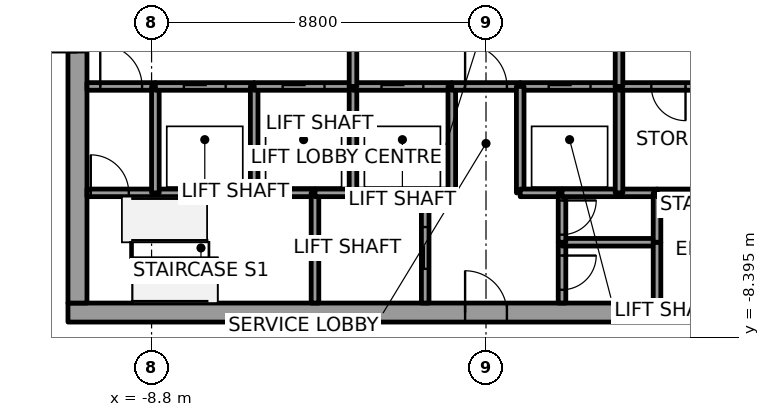
"""IFC4 building model, lengths in metres.
Left out: names, types, materials, properties, quantities, classifications, styles, units other than length and angle.
Written with IfcOpenShell. Run it as: python <this file> out.ifc"""

import sys

from ifc_helpers import new_model, si_unit, direction, frame, frame_2d, origin, place, context, subcontext, project, spatial, rectangle, extrude, element, fill, save


model = new_model("IFC4")
c1 = context("Model", 3, precision=1e-05, world=origin(), true_north=direction((0.0, 1.0)))
c2 = subcontext(c1, "Body", "Model", "MODEL_VIEW")
j1 = project(units=[si_unit("LENGTHUNIT", "METRE"), si_unit("PLANEANGLEUNIT", "RADIAN")], contexts=[c1])
p1 = place(None, origin())
s1 = spatial("IfcSite", under=j1, at=p1, CompositionType="ELEMENT")
p2 = place(p1, origin())
s2 = spatial("IfcBuilding", under=s1, at=p2, CompositionType="ELEMENT")
p3 = place(p2, frame((0.0, 0.0, 28.8)))
s3 = spatial("IfcBuildingStorey", under=s2, at=p3, CompositionType="ELEMENT", Elevation=28.8)
p4 = place(p3, frame((-11.0, -7.75, 0.0), z_axis=(0.0, 0.0, 1.0), x_axis=(1.0, 0.0, 0.0)))
e1 = element("IfcWall", 1, at=p4, inside=s3, PredefinedType="SHEAR", context=c2, shape_type="SweptSolid", body=[
    extrude(rectangle(XDim=22.0, YDim=0.5, at=frame_2d((11.0, 0.0))), origin(), (0.0, 0.0, 1.0), 5.4),
])
p5 = place(p4, frame((10.45, 0.0, 0.0)))
e2 = element("IfcOpeningElement", 2, at=p5, cuts=e1, PredefinedType="OPENING", context=c2, shape_type="SweptSolid", body=[
    extrude(rectangle(XDim=1.1, YDim=2.1, at=frame_2d((0.55, 1.05))), frame((0.0, 0.25, 0.0), z_axis=(0.0, -1.0, 0.0), x_axis=(1.0, 0.0, 0.0)), (0.0, 0.0, 1.0), 0.5),
])
p6 = place(p3, frame((-10.75, -7.5, 0.0), z_axis=(0.0, 0.0, 1.0), x_axis=(0.0, 1.0, 0.0)))
e3 = element("IfcWall", 3, at=p6, inside=s3, PredefinedType="SHEAR", context=c2, shape_type="SweptSolid", body=[
    extrude(rectangle(XDim=15.0, YDim=0.5, at=frame_2d((7.5, 0.0))), origin(), (0.0, 0.0, 1.0), 5.4),
])
p7 = place(p6, frame((6.6, 0.0, 0.0)))
e4 = element("IfcOpeningElement", 4, at=p7, cuts=e3, PredefinedType="OPENING", context=c2, shape_type="SweptSolid", body=[
    extrude(rectangle(XDim=1.8, YDim=2.1, at=frame_2d((0.9, 1.05))), frame((0.0, 0.25, 0.0), z_axis=(0.0, -1.0, 0.0), x_axis=(1.0, 0.0, 0.0)), (0.0, 0.0, 1.0), 0.5),
])
p8 = place(p3, frame((-10.5, -4.6, 0.0), z_axis=(0.0, 0.0, 1.0), x_axis=(1.0, 0.0, 0.0)))
e5 = element("IfcWall", 5, at=p8, inside=s3, PredefinedType="SOLIDWALL", context=c2, shape_type="SweptSolid", body=[
    extrude(rectangle(XDim=1.8, YDim=0.2, at=frame_2d((0.9, 0.0))), origin(), (0.0, 0.0, 1.0), 5.0),
])
p9 = place(p8, frame((0.1, 0.0, 0.0)))
e6 = element("IfcOpeningElement", 6, at=p9, cuts=e5, PredefinedType="OPENING", context=c2, shape_type="SweptSolid", body=[
    extrude(rectangle(XDim=1.0, YDim=2.1, at=frame_2d((0.5, 1.05))), frame((0.0, 0.1, 0.0), z_axis=(0.0, -1.0, 0.0), x_axis=(1.0, 0.0, 0.0)), (0.0, 0.0, 1.0), 0.2),
])
p10 = place(p3, frame((-10.5, -1.8, 0.0), z_axis=(0.0, 0.0, 1.0), x_axis=(1.0, 0.0, 0.0)))
e7 = element("IfcWall", 7, at=p10, inside=s3, PredefinedType="SOLIDWALL", context=c2, shape_type="SweptSolid", body=[
    extrude(rectangle(XDim=1.8, YDim=0.2, at=frame_2d((0.9, 0.0))), origin(), (0.0, 0.0, 1.0), 5.0),
])
p11 = place(p10, frame((0.35, 0.0, 0.0)))
e8 = element("IfcOpeningElement", 8, at=p11, cuts=e7, PredefinedType="OPENING", context=c2, shape_type="SweptSolid", body=[
    extrude(rectangle(XDim=1.1, YDim=2.4, at=frame_2d((0.55, 1.2))), frame((0.0, 0.1, 0.0), z_axis=(0.0, -1.0, 0.0), x_axis=(1.0, 0.0, 0.0)), (0.0, 0.0, 1.0), 0.2),
])
p12 = place(p3, frame((-8.7, -4.6, 0.0), z_axis=(0.0, 0.0, 1.0), x_axis=(1.0, 0.0, 0.0)))
e9 = element("IfcWall", 9, at=p12, inside=s3, PredefinedType="SOLIDWALL", context=c2, shape_type="SweptSolid", body=[
    extrude(rectangle(XDim=2.6, YDim=0.2, at=frame_2d((1.3, 0.0))), origin(), (0.0, 0.0, 1.0), 5.0),
])
p13 = place(p3, frame((-8.7, -4.6, 0.0), z_axis=(0.0, 0.0, 1.0), x_axis=(0.0, 1.0, 0.0)))
e10 = element("IfcWall", 10, at=p13, inside=s3, PredefinedType="SOLIDWALL", context=c2, shape_type="SweptSolid", body=[
    extrude(rectangle(XDim=2.8, YDim=0.2, at=frame_2d((1.4, 0.0))), origin(), (0.0, 0.0, 1.0), 5.0),
])
p14 = place(p3, frame((-8.7, -1.8, 0.0), z_axis=(0.0, 0.0, 1.0), x_axis=(1.0, 0.0, 0.0)))
e11 = element("IfcWall", 11, at=p14, inside=s3, PredefinedType="SOLIDWALL", context=c2, shape_type="SweptSolid", body=[
    extrude(rectangle(XDim=2.6, YDim=0.2, at=frame_2d((1.3, 0.0))), origin(), (0.0, 0.0, 1.0), 5.0),
])
p15 = place(p14, frame((0.75, 0.0, 0.0)))
e12 = element("IfcOpeningElement", 12, at=p15, cuts=e11, PredefinedType="OPENING", context=c2, shape_type="SweptSolid", body=[
    extrude(rectangle(XDim=1.1, YDim=2.1, at=frame_2d((0.55, 1.05))), frame((0.0, 0.1, 0.0), z_axis=(0.0, -1.0, 0.0), x_axis=(1.0, 0.0, 0.0)), (0.0, 0.0, 1.0), 0.2),
])
p16 = place(p3, frame((-6.1, -4.6, 0.0), z_axis=(0.0, 0.0, 1.0), x_axis=(1.0, 0.0, 0.0)))
e13 = element("IfcWall", 13, at=p16, inside=s3, PredefinedType="SOLIDWALL", context=c2, shape_type="SweptSolid", body=[
    extrude(rectangle(XDim=1.6, YDim=0.2, at=frame_2d((0.8, 0.0))), origin(), (0.0, 0.0, 1.0), 5.0),
])
p17 = place(p3, frame((-6.1, -4.6, 0.0), z_axis=(0.0, 0.0, 1.0), x_axis=(0.0, 1.0, 0.0)))
e14 = element("IfcWall", 14, at=p17, inside=s3, PredefinedType="SOLIDWALL", context=c2, shape_type="SweptSolid", body=[
    extrude(rectangle(XDim=2.8, YDim=0.2, at=frame_2d((1.4, 0.0))), origin(), (0.0, 0.0, 1.0), 5.0),
])
p18 = place(p3, frame((-6.1, -1.8, 0.0), z_axis=(0.0, 0.0, 1.0), x_axis=(1.0, 0.0, 0.0)))
e15 = element("IfcWall", 15, at=p18, inside=s3, PredefinedType="SOLIDWALL", context=c2, shape_type="SweptSolid", body=[
    extrude(rectangle(XDim=2.6, YDim=0.2, at=frame_2d((1.3, 0.0))), origin(), (0.0, 0.0, 1.0), 5.0),
])
p19 = place(p18, frame((0.75, 0.0, 0.0)))
e16 = element("IfcOpeningElement", 16, at=p19, cuts=e15, PredefinedType="OPENING", context=c2, shape_type="SweptSolid", body=[
    extrude(rectangle(XDim=1.1, YDim=2.1, at=frame_2d((0.55, 1.05))), frame((0.0, 0.1, 0.0), z_axis=(0.0, -1.0, 0.0), x_axis=(1.0, 0.0, 0.0)), (0.0, 0.0, 1.0), 0.2),
])
p20 = place(p3, frame((-4.5, -4.6, 0.0), z_axis=(0.0, 0.0, 1.0), x_axis=(0.0, -1.0, 0.0)))
e17 = element("IfcWall", 17, at=p20, inside=s3, PredefinedType="SOLIDWALL", context=c2, shape_type="SweptSolid", body=[
    extrude(rectangle(XDim=2.9, YDim=0.2, at=frame_2d((1.45, 0.0))), origin(), (0.0, 0.0, 1.0), 5.0),
])
p21 = place(p3, frame((-4.5, -4.6, 0.0), z_axis=(0.0, 0.0, 1.0), x_axis=(1.0, 0.0, 0.0)))
e18 = element("IfcWall", 18, at=p21, inside=s3, PredefinedType="SOLIDWALL", context=c2, shape_type="SweptSolid", body=[
    extrude(rectangle(XDim=1.0, YDim=0.2, at=frame_2d((0.5, 0.0))), origin(), (0.0, 0.0, 1.0), 5.0),
])
p22 = place(p3, frame((-3.5, -4.6, 0.0), z_axis=(0.0, 0.0, 1.0), x_axis=(1.0, 0.0, 0.0)))
e19 = element("IfcWall", 19, at=p22, inside=s3, PredefinedType="SOLIDWALL", context=c2, shape_type="SweptSolid", body=[
    extrude(rectangle(XDim=1.9, YDim=0.2, at=frame_2d((0.95, 0.0))), origin(), (0.0, 0.0, 1.0), 5.0),
])
p23 = place(p3, frame((-3.5, -4.6, 0.0), z_axis=(0.0, 0.0, 1.0), x_axis=(0.0, 1.0, 0.0)))
e20 = element("IfcWall", 20, at=p23, inside=s3, PredefinedType="SOLIDWALL", context=c2, shape_type="SweptSolid", body=[
    extrude(rectangle(XDim=2.8, YDim=0.2, at=frame_2d((1.4, 0.0))), origin(), (0.0, 0.0, 1.0), 5.0),
])
p24 = place(p3, frame((-3.5, -1.8, 0.0), z_axis=(0.0, 0.0, 1.0), x_axis=(1.0, 0.0, 0.0)))
e21 = element("IfcWall", 21, at=p24, inside=s3, PredefinedType="SOLIDWALL", context=c2, shape_type="SweptSolid", body=[
    extrude(rectangle(XDim=2.6, YDim=0.2, at=frame_2d((1.3, 0.0))), origin(), (0.0, 0.0, 1.0), 5.0),
])
p25 = place(p24, frame((0.75, 0.0, 0.0)))
e22 = element("IfcOpeningElement", 22, at=p25, cuts=e21, PredefinedType="OPENING", context=c2, shape_type="SweptSolid", body=[
    extrude(rectangle(XDim=1.1, YDim=2.1, at=frame_2d((0.55, 1.05))), frame((0.0, 0.1, 0.0), z_axis=(0.0, -1.0, 0.0), x_axis=(1.0, 0.0, 0.0)), (0.0, 0.0, 1.0), 0.2),
])
p26 = place(p3, frame((-3.5, 1.8, 0.0), z_axis=(0.0, 0.0, 1.0), x_axis=(0.0, -1.0, 0.0)))
e23 = element("IfcWall", 23, at=p26, inside=s3, PredefinedType="SOLIDWALL", context=c2, shape_type="SweptSolid", body=[
    extrude(rectangle(XDim=3.6, YDim=0.2, at=frame_2d((1.8, 0.0))), origin(), (0.0, 0.0, 1.0), 5.0),
])
p27 = place(p26, frame((1.05, 0.0, 0.0)))
e24 = element("IfcOpeningElement", 24, at=p27, cuts=e23, PredefinedType="OPENING", context=c2, shape_type="SweptSolid", body=[
    extrude(rectangle(XDim=1.5, YDim=2.4, at=frame_2d((0.75, 1.2))), frame((0.0, 0.1, 0.0), z_axis=(0.0, -1.0, 0.0), x_axis=(1.0, 0.0, 0.0)), (0.0, 0.0, 1.0), 0.2),
])
p28 = place(p3, frame((-1.6, -7.5, 0.0), z_axis=(0.0, 0.0, 1.0), x_axis=(0.0, 1.0, 0.0)))
e25 = element("IfcWall", 25, at=p28, inside=s3, PredefinedType="SOLIDWALL", context=c2, shape_type="SweptSolid", body=[
    extrude(rectangle(XDim=2.9, YDim=0.2, at=frame_2d((1.45, 0.0))), origin(), (0.0, 0.0, 1.0), 5.0),
])
p29 = place(p28, frame((0.9, 0.0, 0.0)))
e26 = element("IfcOpeningElement", 26, at=p29, cuts=e25, PredefinedType="OPENING", context=c2, shape_type="SweptSolid", body=[
    extrude(rectangle(XDim=1.1, YDim=2.1, at=frame_2d((0.55, 1.05))), frame((0.0, 0.1, 0.0), z_axis=(0.0, -1.0, 0.0), x_axis=(1.0, 0.0, 0.0)), (0.0, 0.0, 1.0), 0.2),
])
p30 = place(p3, frame((-1.6, -4.6, 0.0), z_axis=(0.0, 0.0, 1.0), x_axis=(1.0, 0.0, 0.0)))
e27 = element("IfcWall", 27, at=p30, inside=s3, PredefinedType="SOLIDWALL", context=c2, shape_type="SweptSolid", body=[
    extrude(rectangle(XDim=0.7, YDim=0.2, at=frame_2d((0.35, 0.0))), origin(), (0.0, 0.0, 1.0), 5.0),
])
p31 = place(p3, frame((-0.9, -4.6, 0.0), z_axis=(0.0, 0.0, 1.0), x_axis=(0.0, 1.0, 0.0)))
e28 = element("IfcWall", 28, at=p31, inside=s3, PredefinedType="SOLIDWALL", context=c2, shape_type="SweptSolid", body=[
    extrude(rectangle(XDim=2.8, YDim=0.2, at=frame_2d((1.4, 0.0))), origin(), (0.0, 0.0, 1.0), 5.0),
])
p32 = place(p3, frame((-0.9, -1.8, 0.0), z_axis=(0.0, 0.0, 1.0), x_axis=(1.0, 0.0, 0.0)))
e29 = element("IfcWall", 29, at=p32, inside=s3, PredefinedType="SOLIDWALL", context=c2, shape_type="SweptSolid", body=[
    extrude(rectangle(XDim=1.8, YDim=0.2, at=frame_2d((0.9, 0.0))), origin(), (0.0, 0.0, 1.0), 5.0),
])
p33 = place(p32, frame((0.35, 0.0, 0.0)))
e30 = element("IfcOpeningElement", 30, at=p33, cuts=e29, PredefinedType="OPENING", context=c2, shape_type="SweptSolid", body=[
    extrude(rectangle(XDim=1.1, YDim=2.4, at=frame_2d((0.55, 1.2))), frame((0.0, 0.1, 0.0), z_axis=(0.0, -1.0, 0.0), x_axis=(1.0, 0.0, 0.0)), (0.0, 0.0, 1.0), 0.2),
])
p34 = place(p3, frame((0.9, -1.8, 0.0), z_axis=(0.0, 0.0, 1.0), x_axis=(1.0, 0.0, 0.0)))
e31 = element("IfcWall", 31, at=p34, inside=s3, PredefinedType="SOLIDWALL", context=c2, shape_type="SweptSolid", body=[
    extrude(rectangle(XDim=2.6, YDim=0.2, at=frame_2d((1.3, 0.0))), origin(), (0.0, 0.0, 1.0), 5.0),
])
p35 = place(p34, frame((0.75, 0.0, 0.0)))
e32 = element("IfcOpeningElement", 32, at=p35, cuts=e31, PredefinedType="OPENING", context=c2, shape_type="SweptSolid", body=[
    extrude(rectangle(XDim=1.1, YDim=2.1, at=frame_2d((0.55, 1.05))), frame((0.0, 0.1, 0.0), z_axis=(0.0, -1.0, 0.0), x_axis=(1.0, 0.0, 0.0)), (0.0, 0.0, 1.0), 0.2),
])
p36 = place(p3, frame((0.9, -1.8, 0.0), z_axis=(0.0, 0.0, 1.0), x_axis=(0.0, -1.0, 0.0)))
e33 = element("IfcWall", 33, at=p36, inside=s3, PredefinedType="SOLIDWALL", context=c2, shape_type="SweptSolid", body=[
    extrude(rectangle(XDim=2.8, YDim=0.2, at=frame_2d((1.4, 0.0))), origin(), (0.0, 0.0, 1.0), 5.0),
])
p37 = place(p3, frame((0.9, -4.6, 0.0), z_axis=(0.0, 0.0, 1.0), x_axis=(1.0, 0.0, 0.0)))
e34 = element("IfcWall", 34, at=p37, inside=s3, PredefinedType="SOLIDWALL", context=c2, shape_type="SweptSolid", body=[
    extrude(rectangle(XDim=1.1, YDim=0.2, at=frame_2d((0.55, 0.0))), origin(), (0.0, 0.0, 1.0), 5.0),
])
p38 = place(p3, frame((2.0, -5.9, 0.0), z_axis=(0.0, 0.0, 1.0), x_axis=(0.0, -1.0, 0.0)))
e35 = element("IfcWall", 35, at=p38, inside=s3, PredefinedType="SOLIDWALL", context=c2, shape_type="SweptSolid", body=[
    extrude(rectangle(XDim=1.6, YDim=0.2, at=frame_2d((0.8, 0.0))), origin(), (0.0, 0.0, 1.0), 5.0),
])
p39 = place(p38, frame((0.35, 0.0, 0.0)))
e36 = element("IfcOpeningElement", 36, at=p39, cuts=e35, PredefinedType="OPENING", context=c2, shape_type="SweptSolid", body=[
    extrude(rectangle(XDim=0.9, YDim=2.4, at=frame_2d((0.45, 1.2))), frame((0.0, 0.1, 0.0), z_axis=(0.0, -1.0, 0.0), x_axis=(1.0, 0.0, 0.0)), (0.0, 0.0, 1.0), 0.2),
])
p40 = place(p3, frame((4.5, -5.9, 0.0), z_axis=(0.0, 0.0, 1.0), x_axis=(-1.0, 0.0, 0.0)))
e37 = element("IfcWall", 37, at=p40, inside=s3, PredefinedType="SOLIDWALL", context=c2, shape_type="SweptSolid", body=[
    extrude(rectangle(XDim=2.5, YDim=0.2, at=frame_2d((1.25, 0.0))), origin(), (0.0, 0.0, 1.0), 5.0),
])
p41 = place(p3, frame((2.0, -4.6, 0.0), z_axis=(0.0, 0.0, 1.0), x_axis=(0.0, -1.0, 0.0)))
e38 = element("IfcWall", 38, at=p41, inside=s3, PredefinedType="SOLIDWALL", context=c2, shape_type="SweptSolid", body=[
    extrude(rectangle(XDim=1.3, YDim=0.2, at=frame_2d((0.65, 0.0))), origin(), (0.0, 0.0, 1.0), 5.0),
])
p42 = place(p41, frame((0.2, 0.0, 0.0)))
e39 = element("IfcOpeningElement", 39, at=p42, cuts=e38, PredefinedType="OPENING", context=c2, shape_type="SweptSolid", body=[
    extrude(rectangle(XDim=0.9, YDim=2.4, at=frame_2d((0.45, 1.2))), frame((0.0, 0.1, 0.0), z_axis=(0.0, -1.0, 0.0), x_axis=(1.0, 0.0, 0.0)), (0.0, 0.0, 1.0), 0.2),
])
p43 = place(p3, frame((3.5, -4.6, 0.0), z_axis=(0.0, 0.0, 1.0), x_axis=(-1.0, 0.0, 0.0)))
e40 = element("IfcWall", 40, at=p43, inside=s3, PredefinedType="SOLIDWALL", context=c2, shape_type="SweptSolid", body=[
    extrude(rectangle(XDim=1.5, YDim=0.2, at=frame_2d((0.75, 0.0))), origin(), (0.0, 0.0, 1.0), 5.0),
])
p44 = place(p3, frame((3.5, -4.6, 0.0), z_axis=(0.0, 0.0, 1.0), x_axis=(1.0, 0.0, 0.0)))
e41 = element("IfcWall", 41, at=p44, inside=s3, PredefinedType="SOLIDWALL", context=c2, shape_type="SweptSolid", body=[
    extrude(rectangle(XDim=1.0, YDim=0.2, at=frame_2d((0.5, 0.0))), origin(), (0.0, 0.0, 1.0), 5.0),
])
p45 = place(p3, frame((3.5, -1.8, 0.0), z_axis=(0.0, 0.0, 1.0), x_axis=(0.0, -1.0, 0.0)))
e42 = element("IfcWall", 42, at=p45, inside=s3, PredefinedType="SOLIDWALL", context=c2, shape_type="SweptSolid", body=[
    extrude(rectangle(XDim=2.8, YDim=0.2, at=frame_2d((1.4, 0.0))), origin(), (0.0, 0.0, 1.0), 5.0),
])
p46 = place(p3, frame((6.1, -1.8, 0.0), z_axis=(0.0, 0.0, 1.0), x_axis=(-1.0, 0.0, 0.0)))
e43 = element("IfcWall", 43, at=p46, inside=s3, PredefinedType="SOLIDWALL", context=c2, shape_type="SweptSolid", body=[
    extrude(rectangle(XDim=2.6, YDim=0.2, at=frame_2d((1.3, 0.0))), origin(), (0.0, 0.0, 1.0), 5.0),
])
p47 = place(p46, frame((0.85, 0.0, 0.0)))
e44 = element("IfcOpeningElement", 44, at=p47, cuts=e43, PredefinedType="OPENING", context=c2, shape_type="SweptSolid", body=[
    extrude(rectangle(XDim=0.9, YDim=2.4, at=frame_2d((0.45, 1.2))), frame((0.0, 0.1, 0.0), z_axis=(0.0, -1.0, 0.0), x_axis=(1.0, 0.0, 0.0)), (0.0, 0.0, 1.0), 0.2),
])
p48 = place(p3, frame((3.5, -1.8, 0.0), z_axis=(0.0, 0.0, 1.0), x_axis=(0.0, 1.0, 0.0)))
e45 = element("IfcWall", 45, at=p48, inside=s3, PredefinedType="SOLIDWALL", context=c2, shape_type="SweptSolid", body=[
    extrude(rectangle(XDim=3.6, YDim=0.2, at=frame_2d((1.8, 0.0))), origin(), (0.0, 0.0, 1.0), 5.0),
])
p49 = place(p48, frame((1.05, 0.0, 0.0)))
e46 = element("IfcOpeningElement", 46, at=p49, cuts=e45, PredefinedType="OPENING", context=c2, shape_type="SweptSolid", body=[
    extrude(rectangle(XDim=1.5, YDim=2.4, at=frame_2d((0.75, 1.2))), frame((0.0, 0.1, 0.0), z_axis=(0.0, -1.0, 0.0), x_axis=(1.0, 0.0, 0.0)), (0.0, 0.0, 1.0), 0.2),
])
p50 = place(p3, frame((4.5, -7.5, 0.0), z_axis=(0.0, 0.0, 1.0), x_axis=(0.0, 1.0, 0.0)))
e47 = element("IfcWall", 47, at=p50, inside=s3, PredefinedType="SOLIDWALL", context=c2, shape_type="SweptSolid", body=[
    extrude(rectangle(XDim=1.6, YDim=0.2, at=frame_2d((0.8, 0.0))), origin(), (0.0, 0.0, 1.0), 5.0),
])
p51 = place(p3, frame((4.5, -5.9, 0.0), z_axis=(0.0, 0.0, 1.0), x_axis=(0.0, 1.0, 0.0)))
e48 = element("IfcWall", 48, at=p51, inside=s3, PredefinedType="SOLIDWALL", context=c2, shape_type="SweptSolid", body=[
    extrude(rectangle(XDim=1.3, YDim=0.2, at=frame_2d((0.65, 0.0))), origin(), (0.0, 0.0, 1.0), 5.0),
])
p52 = place(p3, frame((4.5, -4.6, 0.0), z_axis=(0.0, 0.0, 1.0), x_axis=(1.0, 0.0, 0.0)))
e49 = element("IfcWall", 49, at=p52, inside=s3, PredefinedType="SOLIDWALL", context=c2, shape_type="SweptSolid", body=[
    extrude(rectangle(XDim=1.6, YDim=0.2, at=frame_2d((0.8, 0.0))), origin(), (0.0, 0.0, 1.0), 5.0),
])
p53 = place(p15, origin())
e50 = element("IfcDoor", 50, at=p53, inside=s3, OperationType="SLIDING_TO_LEFT", PredefinedType="DOOR", context=c2, shape_type="SweptSolid", body=[
    extrude(rectangle(XDim=1.1, YDim=2.1, at=frame_2d((0.55, 1.05))), frame((0.0, 0.025, 0.0), z_axis=(0.0, -1.0, 0.0), x_axis=(1.0, 0.0, 0.0)), (0.0, 0.0, 1.0), 0.05),
])
fill(e12, e50)
p54 = place(p19, origin())
e51 = element("IfcDoor", 51, at=p54, inside=s3, OperationType="SLIDING_TO_RIGHT", PredefinedType="DOOR", context=c2, shape_type="SweptSolid", body=[
    extrude(rectangle(XDim=1.1, YDim=2.1, at=frame_2d((0.55, 1.05))), frame((0.0, 0.025, 0.0), z_axis=(0.0, -1.0, 0.0), x_axis=(1.0, 0.0, 0.0)), (0.0, 0.0, 1.0), 0.05),
])
fill(e16, e51)
p55 = place(p25, origin())
e52 = element("IfcDoor", 52, at=p55, inside=s3, OperationType="SLIDING_TO_RIGHT", PredefinedType="DOOR", context=c2, shape_type="SweptSolid", body=[
    extrude(rectangle(XDim=1.1, YDim=2.1, at=frame_2d((0.55, 1.05))), frame((0.0, 0.025, 0.0), z_axis=(0.0, -1.0, 0.0), x_axis=(1.0, 0.0, 0.0)), (0.0, 0.0, 1.0), 0.05),
])
fill(e22, e52)
p56 = place(p35, origin())
e53 = element("IfcDoor", 53, at=p56, inside=s3, OperationType="SLIDING_TO_LEFT", PredefinedType="DOOR", context=c2, shape_type="SweptSolid", body=[
    extrude(rectangle(XDim=1.1, YDim=2.1, at=frame_2d((0.55, 1.05))), frame((0.0, 0.025, 0.0), z_axis=(0.0, -1.0, 0.0), x_axis=(1.0, 0.0, 0.0)), (0.0, 0.0, 1.0), 0.05),
])
fill(e32, e53)
p57 = place(p29, origin())
e54 = element("IfcDoor", 54, at=p57, inside=s3, OperationType="SLIDING_TO_RIGHT", PredefinedType="DOOR", context=c2, shape_type="SweptSolid", body=[
    extrude(rectangle(XDim=1.1, YDim=2.1, at=frame_2d((0.55, 1.05))), frame((0.0, 0.025, 0.0), z_axis=(0.0, -1.0, 0.0), x_axis=(1.0, 0.0, 0.0)), (0.0, 0.0, 1.0), 0.05),
])
fill(e26, e54)
p58 = place(p11, origin())
e55 = element("IfcDoor", 55, at=p58, inside=s3, OperationType="SINGLE_SWING_RIGHT", PredefinedType="DOOR", context=c2, shape_type="SweptSolid", body=[
    extrude(rectangle(XDim=1.1, YDim=2.4, at=frame_2d((0.55, 1.2))), frame((0.0, 0.025, 0.0), z_axis=(0.0, -1.0, 0.0), x_axis=(1.0, 0.0, 0.0)), (0.0, 0.0, 1.0), 0.05),
])
fill(e8, e55)
p59 = place(p33, origin())
e56 = element("IfcDoor", 56, at=p59, inside=s3, OperationType="SINGLE_SWING_RIGHT", PredefinedType="DOOR", context=c2, shape_type="SweptSolid", body=[
    extrude(rectangle(XDim=1.1, YDim=2.4, at=frame_2d((0.55, 1.2))), frame((0.0, 0.025, 0.0), z_axis=(0.0, -1.0, 0.0), x_axis=(1.0, 0.0, 0.0)), (0.0, 0.0, 1.0), 0.05),
])
fill(e30, e56)
p60 = place(p9, origin())
e57 = element("IfcDoor", 57, at=p60, inside=s3, OperationType="SINGLE_SWING_LEFT", PredefinedType="DOOR", context=c2, shape_type="SweptSolid", body=[
    extrude(rectangle(XDim=1.0, YDim=2.1, at=frame_2d((0.5, 1.05))), frame((0.0, 0.025, 0.0), z_axis=(0.0, -1.0, 0.0), x_axis=(1.0, 0.0, 0.0)), (0.0, 0.0, 1.0), 0.05),
])
fill(e6, e57)
p61 = place(p47, origin())
e58 = element("IfcDoor", 58, at=p61, inside=s3, OperationType="SINGLE_SWING_RIGHT", PredefinedType="DOOR", context=c2, shape_type="SweptSolid", body=[
    extrude(rectangle(XDim=0.9, YDim=2.4, at=frame_2d((0.45, 1.2))), frame((0.0, 0.025, 0.0), z_axis=(0.0, -1.0, 0.0), x_axis=(1.0, 0.0, 0.0)), (0.0, 0.0, 1.0), 0.05),
])
fill(e44, e58)
p62 = place(p39, origin())
e59 = element("IfcDoor", 59, at=p62, inside=s3, OperationType="SINGLE_SWING_LEFT", PredefinedType="DOOR", context=c2, shape_type="SweptSolid", body=[
    extrude(rectangle(XDim=0.9, YDim=2.4, at=frame_2d((0.45, 1.2))), frame((0.0, 0.025, 0.0), z_axis=(0.0, -1.0, 0.0), x_axis=(1.0, 0.0, 0.0)), (0.0, 0.0, 1.0), 0.05),
])
fill(e36, e59)
p63 = place(p42, origin())
e60 = element("IfcDoor", 60, at=p63, inside=s3, OperationType="SINGLE_SWING_RIGHT", PredefinedType="DOOR", context=c2, shape_type="SweptSolid", body=[
    extrude(rectangle(XDim=0.9, YDim=2.4, at=frame_2d((0.45, 1.2))), frame((0.0, 0.025, 0.0), z_axis=(0.0, -1.0, 0.0), x_axis=(1.0, 0.0, 0.0)), (0.0, 0.0, 1.0), 0.05),
])
fill(e39, e60)
p64 = place(p7, origin())
e61 = element("IfcDoor", 61, at=p64, inside=s3, OperationType="DOUBLE_DOOR_SINGLE_SWING", PredefinedType="DOOR", context=c2, shape_type="SweptSolid", body=[
    extrude(rectangle(XDim=1.8, YDim=2.1, at=frame_2d((0.9, 1.05))), frame((0.0, 0.025, 0.0), z_axis=(0.0, -1.0, 0.0), x_axis=(1.0, 0.0, 0.0)), (0.0, 0.0, 1.0), 0.05),
])
fill(e4, e61)
p65 = place(p5, origin())
e62 = element("IfcDoor", 62, at=p65, inside=s3, OperationType="SINGLE_SWING_LEFT", PredefinedType="DOOR", context=c2, shape_type="SweptSolid", body=[
    extrude(rectangle(XDim=1.1, YDim=2.1, at=frame_2d((0.55, 1.05))), frame((0.0, 0.025, 0.0), z_axis=(0.0, -1.0, 0.0), x_axis=(1.0, 0.0, 0.0)), (0.0, 0.0, 1.0), 0.05),
])
fill(e2, e62)
save(model, sys.argv[1])
